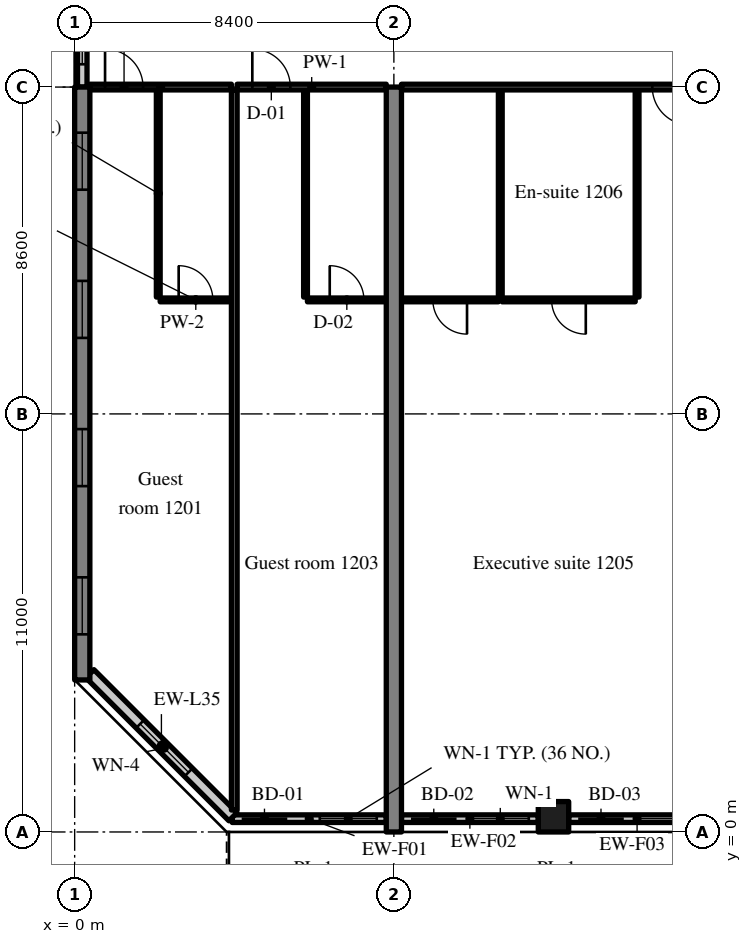
"""IFC4 building model, lengths in metres.
Left out: names, types, materials, properties, quantities, classifications, styles, units other than length and angle.
Written with IfcOpenShell. Run it as: python <this file> out.ifc"""

import sys

from ifc_helpers import new_model, si_unit, direction, frame, frame_2d, origin, origin_2d, place, context, subcontext, project, spatial, rectangle, extrude, source, transform, mapped, element, fill, save


model = new_model("IFC4")
c1 = context("Model", 3, precision=1e-05, world=origin(), true_north=direction((0.0, 1.0)))
c2 = subcontext(c1, "Body", "Model", "MODEL_VIEW")
j1 = project(units=[si_unit("LENGTHUNIT", "METRE"), si_unit("PLANEANGLEUNIT", "RADIAN")], contexts=[c1])
p1 = place(None, origin())
s1 = spatial("IfcSite", under=j1, at=p1, CompositionType="ELEMENT")
p2 = place(p1, origin())
s2 = spatial("IfcBuilding", under=s1, at=p2, CompositionType="ELEMENT")
p3 = place(p2, frame((0.0, 0.0, 54.4)))
s3 = spatial("IfcBuildingStorey", under=s2, at=p3, CompositionType="ELEMENT", Elevation=54.4)
m1 = source(origin(), c2, "Body", "SweptSolid", [
    extrude(rectangle(XDim=15.6, YDim=0.4, at=frame_2d((7.8, 0.0))), origin(), (0.0, 0.0, 1.0), 3.52),
])
p4 = place(p3, frame((0.2, 4.0, 0.0), z_axis=(0.0, 0.0, 1.0), x_axis=(0.0, 1.0, 0.0)))
e1 = element("IfcWall", 1, at=p4, inside=s3, PredefinedType="SHEAR", context=c2, shape_type="MappedRepresentation", body=[
    mapped(m1, transform((0.0, 0.0, 0.0), scale=1.0)),
])
m2 = source(origin(), c2, "Body", "SweptSolid", [
    extrude(rectangle(XDim=1.5, YDim=1.5, at=frame_2d((0.75, 0.75))), frame((0.0, 0.21, 0.0), z_axis=(0.0, -1.0, 0.0), x_axis=(1.0, 0.0, 0.0)), (0.0, 0.0, 1.0), 0.42),
])
p5 = place(p4, frame((1.2, 0.0, 0.9)))
e2 = element("IfcOpeningElement", 2, at=p5, cuts=e1, PredefinedType="OPENING", context=c2, shape_type="MappedRepresentation", body=[
    mapped(m2, transform((0.0, 0.0, 0.0), scale=1.0)),
])
p6 = place(p4, frame((5.1, 0.0, 0.9)))
e3 = element("IfcOpeningElement", 3, at=p6, cuts=e1, PredefinedType="OPENING", context=c2, shape_type="MappedRepresentation", body=[
    mapped(m2, transform((0.0, 0.0, 0.0), scale=1.0)),
])
p7 = place(p4, frame((9.0, 0.0, 0.9)))
e4 = element("IfcOpeningElement", 4, at=p7, cuts=e1, PredefinedType="OPENING", context=c2, shape_type="MappedRepresentation", body=[
    mapped(m2, transform((0.0, 0.0, 0.0), scale=1.0)),
])
p8 = place(p4, frame((12.9, 0.0, 0.9)))
e5 = element("IfcOpeningElement", 5, at=p8, cuts=e1, PredefinedType="OPENING", context=c2, shape_type="MappedRepresentation", body=[
    mapped(m2, transform((0.0, 0.0, 0.0), scale=1.0)),
])
m3 = source(origin(), c2, "Body", "SweptSolid", [
    extrude(rectangle(XDim=19.6, YDim=0.4, at=frame_2d((9.8, 0.0))), origin(), (0.0, 0.0, 1.0), 3.52),
])
p9 = place(p3, frame((8.4, 0.0, 0.0), z_axis=(0.0, 0.0, 1.0), x_axis=(0.0, 1.0, 0.0)))
e6 = element("IfcWall", 6, at=p9, inside=s3, PredefinedType="SHEAR", context=c2, shape_type="MappedRepresentation", body=[
    mapped(m3, transform((0.0, 0.0, 0.0), scale=1.0)),
])
m4 = source(origin(), c2, "Body", "SweptSolid", [
    extrude(rectangle(XDim=0.8, YDim=0.8, at=origin_2d()), origin(), (0.0, 0.0, 1.0), 3.52),
])
p10 = place(p3, frame((12.6, 0.4, 0.0), z_axis=(0.0, 0.0, 1.0), x_axis=(1.0, 0.0, 0.0)))
e7 = element("IfcColumn", 7, at=p10, inside=s3, PredefinedType="COLUMN", context=c2, shape_type="MappedRepresentation", body=[
    mapped(m4, transform((0.0, 0.0, 0.0), scale=1.0)),
])
m5 = source(origin(), c2, "Body", "SweptSolid", [
    extrude(rectangle(XDim=4.055, YDim=0.2, at=frame_2d((2.027, 0.0))), origin(), (0.0, 0.0, 1.0), 2.82),
])
p11 = place(p3, frame((4.145, 0.35, 0.0), z_axis=(0.0, 0.0, 1.0), x_axis=(1.0, 0.0, 0.0)))
e8 = element("IfcWall", 8, at=p11, inside=s3, PredefinedType="SOLIDWALL", context=c2, shape_type="MappedRepresentation", body=[
    mapped(m5, transform((0.0, 0.0, 0.0), scale=1.0)),
])
m6 = source(origin(), c2, "Body", "SweptSolid", [
    extrude(rectangle(XDim=1.2, YDim=2.4, at=frame_2d((0.6, 1.2))), frame((0.0, 0.11, 0.0), z_axis=(0.0, -1.0, 0.0), x_axis=(1.0, 0.0, 0.0)), (0.0, 0.0, 1.0), 0.22),
])
p12 = place(p11, frame((0.25, 0.0, 0.0)))
e9 = element("IfcOpeningElement", 9, at=p12, cuts=e8, PredefinedType="OPENING", context=c2, shape_type="MappedRepresentation", body=[
    mapped(m6, transform((0.0, 0.0, 0.0), scale=1.0)),
])
m7 = source(origin(), c2, "Body", "SweptSolid", [
    extrude(rectangle(XDim=1.5, YDim=1.5, at=frame_2d((0.75, 0.75))), frame((0.0, 0.11, 0.0), z_axis=(0.0, -1.0, 0.0), x_axis=(1.0, 0.0, 0.0)), (0.0, 0.0, 1.0), 0.22),
])
p13 = place(p11, frame((2.305, 0.0, 0.9)))
e10 = element("IfcOpeningElement", 10, at=p13, cuts=e8, PredefinedType="OPENING", context=c2, shape_type="MappedRepresentation", body=[
    mapped(m7, transform((0.0, 0.0, 0.0), scale=1.0)),
])
m8 = source(origin(), c2, "Body", "SweptSolid", [
    extrude(rectangle(XDim=3.6, YDim=0.2, at=frame_2d((1.8, 0.0))), origin(), (0.0, 0.0, 1.0), 2.82),
])
p14 = place(p3, frame((8.6, 0.35, 0.0), z_axis=(0.0, 0.0, 1.0), x_axis=(1.0, 0.0, 0.0)))
e11 = element("IfcWall", 11, at=p14, inside=s3, PredefinedType="SOLIDWALL", context=c2, shape_type="MappedRepresentation", body=[
    mapped(m8, transform((0.0, 0.0, 0.0), scale=1.0)),
])
p15 = place(p14, frame((0.25, 0.0, 0.0)))
e12 = element("IfcOpeningElement", 12, at=p15, cuts=e11, PredefinedType="OPENING", context=c2, shape_type="MappedRepresentation", body=[
    mapped(m6, transform((0.0, 0.0, 0.0), scale=1.0)),
])
p16 = place(p14, frame((1.85, 0.0, 0.9)))
e13 = element("IfcOpeningElement", 13, at=p16, cuts=e11, PredefinedType="OPENING", context=c2, shape_type="MappedRepresentation", body=[
    mapped(m7, transform((0.0, 0.0, 0.0), scale=1.0)),
])
m9 = source(origin(), c2, "Body", "SweptSolid", [
    extrude(rectangle(XDim=3.6, YDim=0.2, at=frame_2d((1.8, 0.0))), origin(), (0.0, 0.0, 1.0), 2.82),
])
p17 = place(p3, frame((13.0, 0.35, 0.0), z_axis=(0.0, 0.0, 1.0), x_axis=(1.0, 0.0, 0.0)))
e14 = element("IfcWall", 14, at=p17, inside=s3, PredefinedType="SOLIDWALL", context=c2, shape_type="MappedRepresentation", body=[
    mapped(m9, transform((0.0, 0.0, 0.0), scale=1.0)),
])
p18 = place(p17, frame((0.25, 0.0, 0.0)))
e15 = element("IfcOpeningElement", 15, at=p18, cuts=e14, PredefinedType="OPENING", context=c2, shape_type="MappedRepresentation", body=[
    mapped(m6, transform((0.0, 0.0, 0.0), scale=1.0)),
])
p19 = place(p17, frame((1.85, 0.0, 0.9)))
e16 = element("IfcOpeningElement", 16, at=p19, cuts=e14, PredefinedType="OPENING", context=c2, shape_type="MappedRepresentation", body=[
    mapped(m7, transform((0.0, 0.0, 0.0), scale=1.0)),
])
m10 = source(origin(), c2, "Body", "SweptSolid", [
    extrude(rectangle(XDim=5.326, YDim=0.3, at=frame_2d((2.663, 0.0))), origin(), (0.0, 0.0, 1.0), 3.52),
])
p20 = place(p3, frame((0.4, 4.166, 0.0), z_axis=(0.0, 0.0, 1.0), x_axis=(0.707106781187, -0.707106781187, 0.0)))
e17 = element("IfcWall", 17, at=p20, inside=s3, PredefinedType="SOLIDWALL", context=c2, shape_type="MappedRepresentation", body=[
    mapped(m10, transform((0.0, 0.0, 0.0), scale=1.0)),
])
m11 = source(origin(), c2, "Body", "SweptSolid", [
    extrude(rectangle(XDim=1.8, YDim=1.5, at=frame_2d((0.9, 0.75))), frame((0.0, 0.16, 0.0), z_axis=(0.0, -1.0, 0.0), x_axis=(1.0, 0.0, 0.0)), (0.0, 0.0, 1.0), 0.32),
])
p21 = place(p20, frame((1.871, 0.0, 0.9)))
e18 = element("IfcOpeningElement", 18, at=p21, cuts=e17, PredefinedType="OPENING", context=c2, shape_type="MappedRepresentation", body=[
    mapped(m11, transform((0.0, 0.0, 0.0), scale=1.0)),
])
m12 = source(origin(), c2, "Body", "SweptSolid", [
    extrude(rectangle(XDim=2.4, YDim=0.25, at=frame_2d((1.2, 0.0))), origin(), (0.0, 0.0, 1.0), 2.62),
])
p22 = place(p3, frame((0.2, 19.6, 0.0), z_axis=(0.0, 0.0, 1.0), x_axis=(0.0, 1.0, 0.0)))
e19 = element("IfcWall", 19, at=p22, inside=s3, PredefinedType="SOLIDWALL", context=c2, shape_type="MappedRepresentation", body=[
    mapped(m12, transform((0.0, 0.0, 0.0), scale=1.0)),
])
m13 = source(origin(), c2, "Body", "SweptSolid", [
    extrude(rectangle(XDim=1.2, YDim=1.5, at=frame_2d((0.6, 0.75))), frame((0.0, 0.135, 0.0), z_axis=(0.0, -1.0, 0.0), x_axis=(1.0, 0.0, 0.0)), (0.0, 0.0, 1.0), 0.27),
])
p23 = place(p22, frame((0.6, 0.0, 0.9)))
e20 = element("IfcOpeningElement", 20, at=p23, cuts=e19, PredefinedType="OPENING", context=c2, shape_type="MappedRepresentation", body=[
    mapped(m13, transform((0.0, 0.0, 0.0), scale=1.0)),
])
m14 = source(origin(), c2, "Body", "SweptSolid", [
    extrude(rectangle(XDim=5.45, YDim=0.1, at=frame_2d((2.725, 0.0))), origin(), (0.0, 0.0, 1.0), 3.52),
])
p24 = place(p3, frame((2.2, 14.075, 0.0), z_axis=(0.0, 0.0, 1.0), x_axis=(0.0, 1.0, 0.0)))
e21 = element("IfcWall", 21, at=p24, inside=s3, PredefinedType="PARTITIONING", context=c2, shape_type="MappedRepresentation", body=[
    mapped(m14, transform((0.0, 0.0, 0.0), scale=1.0)),
])
m15 = source(origin(), c2, "Body", "SweptSolid", [
    extrude(rectangle(XDim=1.875, YDim=0.1, at=frame_2d((0.938, 0.0))), origin(), (0.0, 0.0, 1.0), 3.52),
])
p25 = place(p3, frame((2.25, 14.0, 0.0), z_axis=(0.0, 0.0, 1.0), x_axis=(1.0, 0.0, 0.0)))
e22 = element("IfcWall", 22, at=p25, inside=s3, PredefinedType="PARTITIONING", context=c2, shape_type="MappedRepresentation", body=[
    mapped(m15, transform((0.0, 0.0, 0.0), scale=1.0)),
])
m16 = source(origin(), c2, "Body", "SweptSolid", [
    extrude(rectangle(XDim=0.9, YDim=2.1, at=frame_2d((0.45, 1.05))), frame((0.0, 0.06, 0.0), z_axis=(0.0, -1.0, 0.0), x_axis=(1.0, 0.0, 0.0)), (0.0, 0.0, 1.0), 0.12),
])
p26 = place(p25, frame((0.487, 0.0, 0.0)))
e23 = element("IfcOpeningElement", 23, at=p26, cuts=e22, PredefinedType="OPENING", context=c2, shape_type="MappedRepresentation", body=[
    mapped(m16, transform((0.0, 0.0, 0.0), scale=1.0)),
])
m17 = source(origin(), c2, "Body", "SweptSolid", [
    extrude(rectangle(XDim=3.725, YDim=0.15, at=frame_2d((1.863, 0.0))), origin(), (0.0, 0.0, 1.0), 2.82),
])
p27 = place(p3, frame((0.4, 19.6, 0.0), z_axis=(0.0, 0.0, 1.0), x_axis=(1.0, 0.0, 0.0)))
e24 = element("IfcWall", 24, at=p27, inside=s3, PredefinedType="PARTITIONING", context=c2, shape_type="MappedRepresentation", body=[
    mapped(m17, transform((0.0, 0.0, 0.0), scale=1.0)),
])
m18 = source(origin(), c2, "Body", "SweptSolid", [
    extrude(rectangle(XDim=1.0, YDim=2.1, at=frame_2d((0.5, 1.05))), frame((0.0, 0.085, 0.0), z_axis=(0.0, -1.0, 0.0), x_axis=(1.0, 0.0, 0.0)), (0.0, 0.0, 1.0), 0.17),
])
p28 = place(p27, frame((0.4, 0.0, 0.0)))
e25 = element("IfcOpeningElement", 25, at=p28, cuts=e24, PredefinedType="OPENING", context=c2, shape_type="MappedRepresentation", body=[
    mapped(m18, transform((0.0, 0.0, 0.0), scale=1.0)),
])
p29 = place(p3, frame((6.075, 14.075, 0.0), z_axis=(0.0, 0.0, 1.0), x_axis=(0.0, 1.0, 0.0)))
e26 = element("IfcWall", 26, at=p29, inside=s3, PredefinedType="PARTITIONING", context=c2, shape_type="MappedRepresentation", body=[
    mapped(m14, transform((0.0, 0.0, 0.0), scale=1.0)),
])
m19 = source(origin(), c2, "Body", "SweptSolid", [
    extrude(rectangle(XDim=2.075, YDim=0.1, at=frame_2d((1.038, 0.0))), origin(), (0.0, 0.0, 1.0), 3.52),
])
p30 = place(p3, frame((6.125, 14.0, 0.0), z_axis=(0.0, 0.0, 1.0), x_axis=(1.0, 0.0, 0.0)))
e27 = element("IfcWall", 27, at=p30, inside=s3, PredefinedType="PARTITIONING", context=c2, shape_type="MappedRepresentation", body=[
    mapped(m19, transform((0.0, 0.0, 0.0), scale=1.0)),
])
p31 = place(p30, frame((0.587, 0.0, 0.0)))
e28 = element("IfcOpeningElement", 28, at=p31, cuts=e27, PredefinedType="OPENING", context=c2, shape_type="MappedRepresentation", body=[
    mapped(m16, transform((0.0, 0.0, 0.0), scale=1.0)),
])
m20 = source(origin(), c2, "Body", "SweptSolid", [
    extrude(rectangle(XDim=3.925, YDim=0.15, at=frame_2d((1.962, 0.0))), origin(), (0.0, 0.0, 1.0), 2.82),
])
p32 = place(p3, frame((4.275, 19.6, 0.0), z_axis=(0.0, 0.0, 1.0), x_axis=(1.0, 0.0, 0.0)))
e29 = element("IfcWall", 29, at=p32, inside=s3, PredefinedType="PARTITIONING", context=c2, shape_type="MappedRepresentation", body=[
    mapped(m20, transform((0.0, 0.0, 0.0), scale=1.0)),
])
p33 = place(p32, frame((0.4, 0.0, 0.0)))
e30 = element("IfcOpeningElement", 30, at=p33, cuts=e29, PredefinedType="OPENING", context=c2, shape_type="MappedRepresentation", body=[
    mapped(m18, transform((0.0, 0.0, 0.0), scale=1.0)),
])
m21 = source(origin(), c2, "Body", "SweptSolid", [
    extrude(rectangle(XDim=18.947, YDim=0.15, at=frame_2d((9.474, 0.0))), origin(), (0.0, 0.0, 1.0), 3.52),
])
p34 = place(p3, frame((4.2, 0.578, 0.0), z_axis=(0.0, 0.0, 1.0), x_axis=(0.0, 1.0, 0.0)))
e31 = element("IfcWall", 31, at=p34, inside=s3, PredefinedType="PARTITIONING", context=c2, shape_type="MappedRepresentation", body=[
    mapped(m21, transform((0.0, 0.0, 0.0), scale=1.0)),
])
for number, where, z_axis, x_axis in (
    (32, (14.8, 14.075, 0.0), (0.0, 0.0, 1.0), (0.0, 1.0, 0.0)),
    (33, (11.2, 14.075, 0.0), (0.0, 0.0, 1.0), (0.0, 1.0, 0.0)),
):
    element("IfcWall", number, at=place(p3, frame(where, z_axis=z_axis, x_axis=x_axis)), inside=s3, PredefinedType="PARTITIONING", context=c2, shape_type="MappedRepresentation", body=[
        mapped(m14, transform((0.0, 0.0, 0.0), scale=1.0)),
    ])
m22 = source(origin(), c2, "Body", "SweptSolid", [
    extrude(rectangle(XDim=3.5, YDim=0.1, at=frame_2d((1.75, 0.0))), origin(), (0.0, 0.0, 1.0), 3.52),
])
p35 = place(p3, frame((11.25, 14.0, 0.0), z_axis=(0.0, 0.0, 1.0), x_axis=(1.0, 0.0, 0.0)))
e34 = element("IfcWall", 34, at=p35, inside=s3, PredefinedType="PARTITIONING", context=c2, shape_type="MappedRepresentation", body=[
    mapped(m22, transform((0.0, 0.0, 0.0), scale=1.0)),
])
p36 = place(p35, frame((1.3, 0.0, 0.0)))
e35 = element("IfcOpeningElement", 35, at=p36, cuts=e34, PredefinedType="OPENING", context=c2, shape_type="MappedRepresentation", body=[
    mapped(m16, transform((0.0, 0.0, 0.0), scale=1.0)),
])
m23 = source(origin(), c2, "Body", "SweptSolid", [
    extrude(rectangle(XDim=2.55, YDim=0.1, at=frame_2d((1.275, 0.0))), origin(), (0.0, 0.0, 1.0), 3.52),
])
p37 = place(p3, frame((8.6, 14.0, 0.0), z_axis=(0.0, 0.0, 1.0), x_axis=(1.0, 0.0, 0.0)))
e36 = element("IfcWall", 36, at=p37, inside=s3, PredefinedType="PARTITIONING", context=c2, shape_type="MappedRepresentation", body=[
    mapped(m23, transform((0.0, 0.0, 0.0), scale=1.0)),
])
p38 = place(p37, frame((0.825, 0.0, 0.0)))
e37 = element("IfcOpeningElement", 37, at=p38, cuts=e36, PredefinedType="OPENING", context=c2, shape_type="MappedRepresentation", body=[
    mapped(m16, transform((0.0, 0.0, 0.0), scale=1.0)),
])
m24 = source(origin(), c2, "Body", "SweptSolid", [
    extrude(rectangle(XDim=8.0, YDim=0.15, at=frame_2d((4.0, 0.0))), origin(), (0.0, 0.0, 1.0), 2.82),
])
p39 = place(p3, frame((8.6, 19.6, 0.0), z_axis=(0.0, 0.0, 1.0), x_axis=(1.0, 0.0, 0.0)))
e38 = element("IfcWall", 38, at=p39, inside=s3, PredefinedType="PARTITIONING", context=c2, shape_type="MappedRepresentation", body=[
    mapped(m24, transform((0.0, 0.0, 0.0), scale=1.0)),
])
p40 = place(p39, frame((6.6, 0.0, 0.0)))
e39 = element("IfcOpeningElement", 39, at=p40, cuts=e38, PredefinedType="OPENING", context=c2, shape_type="MappedRepresentation", body=[
    mapped(m18, transform((0.0, 0.0, 0.0), scale=1.0)),
])
m25 = source(origin(), c2, "Body", "SweptSolid", [
    extrude(rectangle(XDim=1.2, YDim=2.4, at=frame_2d((0.6, 1.2))), frame((0.0, 0.025, 0.0), z_axis=(0.0, -1.0, 0.0), x_axis=(1.0, 0.0, 0.0)), (0.0, 0.0, 1.0), 0.05),
])
p41 = place(p12, origin())
e40 = element("IfcDoor", 40, at=p41, inside=s3, OperationType="SLIDING_TO_LEFT", PredefinedType="DOOR", context=c2, shape_type="MappedRepresentation", body=[
    mapped(m25, transform((0.0, 0.0, 0.0), scale=1.0)),
])
fill(e9, e40)
m26 = source(origin(), c2, "Body", "SweptSolid", [
    extrude(rectangle(XDim=1.5, YDim=1.5, at=frame_2d((0.75, 0.75))), frame((0.0, 0.03, 0.0), z_axis=(0.0, -1.0, 0.0), x_axis=(1.0, 0.0, 0.0)), (0.0, 0.0, 1.0), 0.06),
])
p42 = place(p13, origin())
e41 = element("IfcWindow", 41, at=p42, inside=s3, PartitioningType="SINGLE_PANEL", PredefinedType="WINDOW", context=c2, shape_type="MappedRepresentation", body=[
    mapped(m26, transform((0.0, 0.0, 0.0), scale=1.0)),
])
fill(e10, e41)
p43 = place(p15, origin())
e42 = element("IfcDoor", 42, at=p43, inside=s3, OperationType="SLIDING_TO_RIGHT", PredefinedType="DOOR", context=c2, shape_type="MappedRepresentation", body=[
    mapped(m25, transform((0.0, 0.0, 0.0), scale=1.0)),
])
fill(e12, e42)
p44 = place(p16, origin())
e43 = element("IfcWindow", 43, at=p44, inside=s3, PartitioningType="SINGLE_PANEL", PredefinedType="WINDOW", context=c2, shape_type="MappedRepresentation", body=[
    mapped(m26, transform((0.0, 0.0, 0.0), scale=1.0)),
])
fill(e13, e43)
p45 = place(p18, origin())
e44 = element("IfcDoor", 44, at=p45, inside=s3, OperationType="SLIDING_TO_LEFT", PredefinedType="DOOR", context=c2, shape_type="MappedRepresentation", body=[
    mapped(m25, transform((0.0, 0.0, 0.0), scale=1.0)),
])
fill(e15, e44)
p46 = place(p19, origin())
e45 = element("IfcWindow", 45, at=p46, inside=s3, PartitioningType="SINGLE_PANEL", PredefinedType="WINDOW", context=c2, shape_type="MappedRepresentation", body=[
    mapped(m26, transform((0.0, 0.0, 0.0), scale=1.0)),
])
fill(e16, e45)
m27 = source(origin(), c2, "Body", "SweptSolid", [
    extrude(rectangle(XDim=1.8, YDim=1.5, at=frame_2d((0.9, 0.75))), frame((0.0, 0.03, 0.0), z_axis=(0.0, -1.0, 0.0), x_axis=(1.0, 0.0, 0.0)), (0.0, 0.0, 1.0), 0.06),
])
p47 = place(p21, origin())
e46 = element("IfcWindow", 46, at=p47, inside=s3, PartitioningType="SINGLE_PANEL", PredefinedType="WINDOW", context=c2, shape_type="MappedRepresentation", body=[
    mapped(m27, transform((0.0, 0.0, 0.0), scale=1.0)),
])
fill(e18, e46)
p48 = place(p5, origin())
e47 = element("IfcWindow", 47, at=p48, inside=s3, PartitioningType="SINGLE_PANEL", PredefinedType="WINDOW", context=c2, shape_type="MappedRepresentation", body=[
    mapped(m26, transform((0.0, 0.0, 0.0), scale=1.0)),
])
fill(e2, e47)
p49 = place(p6, origin())
e48 = element("IfcWindow", 48, at=p49, inside=s3, PartitioningType="SINGLE_PANEL", PredefinedType="WINDOW", context=c2, shape_type="MappedRepresentation", body=[
    mapped(m26, transform((0.0, 0.0, 0.0), scale=1.0)),
])
fill(e3, e48)
p50 = place(p7, origin())
e49 = element("IfcWindow", 49, at=p50, inside=s3, PartitioningType="SINGLE_PANEL", PredefinedType="WINDOW", context=c2, shape_type="MappedRepresentation", body=[
    mapped(m26, transform((0.0, 0.0, 0.0), scale=1.0)),
])
fill(e4, e49)
p51 = place(p8, origin())
e50 = element("IfcWindow", 50, at=p51, inside=s3, PartitioningType="SINGLE_PANEL", PredefinedType="WINDOW", context=c2, shape_type="MappedRepresentation", body=[
    mapped(m26, transform((0.0, 0.0, 0.0), scale=1.0)),
])
fill(e5, e50)
m28 = source(origin(), c2, "Body", "SweptSolid", [
    extrude(rectangle(XDim=1.2, YDim=1.5, at=frame_2d((0.6, 0.75))), frame((0.0, 0.03, 0.0), z_axis=(0.0, -1.0, 0.0), x_axis=(1.0, 0.0, 0.0)), (0.0, 0.0, 1.0), 0.06),
])
p52 = place(p23, origin())
e51 = element("IfcWindow", 51, at=p52, inside=s3, PartitioningType="SINGLE_PANEL", PredefinedType="WINDOW", context=c2, shape_type="MappedRepresentation", body=[
    mapped(m28, transform((0.0, 0.0, 0.0), scale=1.0)),
])
fill(e20, e51)
m29 = source(origin(), c2, "Body", "SweptSolid", [
    extrude(rectangle(XDim=0.9, YDim=2.1, at=frame_2d((0.45, 1.05))), frame((0.0, 0.025, 0.0), z_axis=(0.0, -1.0, 0.0), x_axis=(1.0, 0.0, 0.0)), (0.0, 0.0, 1.0), 0.05),
])
p53 = place(p26, origin())
e52 = element("IfcDoor", 52, at=p53, inside=s3, OperationType="SINGLE_SWING_LEFT", PredefinedType="DOOR", context=c2, shape_type="MappedRepresentation", body=[
    mapped(m29, transform((0.0, 0.0, 0.0), scale=1.0)),
])
fill(e23, e52)
m30 = source(origin(), c2, "Body", "SweptSolid", [
    extrude(rectangle(XDim=1.0, YDim=2.1, at=frame_2d((0.5, 1.05))), frame((0.0, 0.025, 0.0), z_axis=(0.0, -1.0, 0.0), x_axis=(1.0, 0.0, 0.0)), (0.0, 0.0, 1.0), 0.05),
])
p54 = place(p28, origin())
e53 = element("IfcDoor", 53, at=p54, inside=s3, OperationType="SINGLE_SWING_LEFT", PredefinedType="DOOR", context=c2, shape_type="MappedRepresentation", body=[
    mapped(m30, transform((0.0, 0.0, 0.0), scale=1.0)),
])
fill(e25, e53)
p55 = place(p31, origin())
e54 = element("IfcDoor", 54, at=p55, inside=s3, OperationType="SINGLE_SWING_LEFT", PredefinedType="DOOR", context=c2, shape_type="MappedRepresentation", body=[
    mapped(m29, transform((0.0, 0.0, 0.0), scale=1.0)),
])
fill(e28, e54)
p56 = place(p33, origin())
e55 = element("IfcDoor", 55, at=p56, inside=s3, OperationType="SINGLE_SWING_LEFT", PredefinedType="DOOR", context=c2, shape_type="MappedRepresentation", body=[
    mapped(m30, transform((0.0, 0.0, 0.0), scale=1.0)),
])
fill(e30, e55)
p57 = place(p36, origin())
e56 = element("IfcDoor", 56, at=p57, inside=s3, OperationType="SINGLE_SWING_RIGHT", PredefinedType="DOOR", context=c2, shape_type="MappedRepresentation", body=[
    mapped(m29, transform((0.0, 0.0, 0.0), scale=1.0)),
])
fill(e35, e56)
p58 = place(p38, origin())
e57 = element("IfcDoor", 57, at=p58, inside=s3, OperationType="SINGLE_SWING_RIGHT", PredefinedType="DOOR", context=c2, shape_type="MappedRepresentation", body=[
    mapped(m29, transform((0.0, 0.0, 0.0), scale=1.0)),
])
fill(e37, e57)
p59 = place(p40, origin())
e58 = element("IfcDoor", 58, at=p59, inside=s3, OperationType="SINGLE_SWING_RIGHT", PredefinedType="DOOR", context=c2, shape_type="MappedRepresentation", body=[
    mapped(m30, transform((0.0, 0.0, 0.0), scale=1.0)),
])
fill(e39, e58)
save(model, sys.argv[1])
